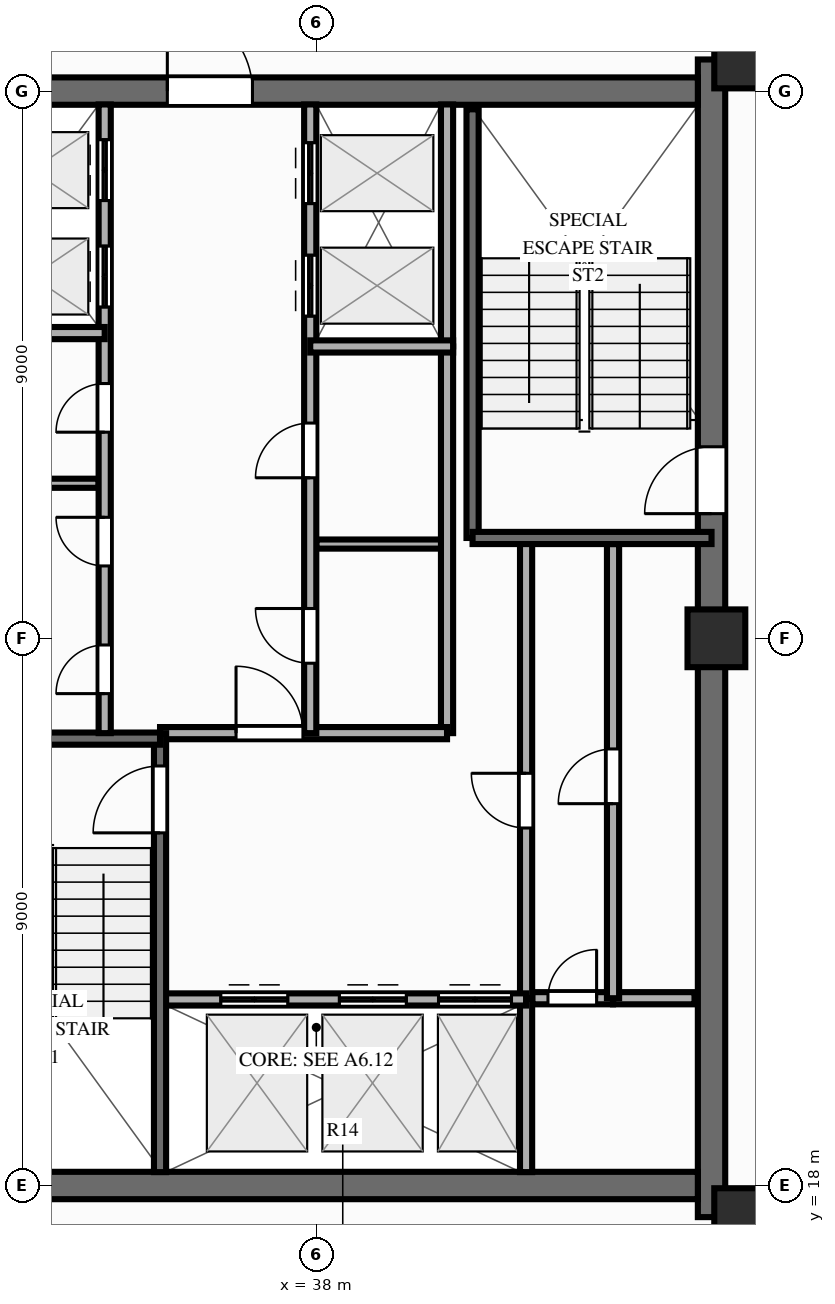
"""IFC4 building model, lengths in metres.
Left out: names, types, materials, properties, quantities, classifications, styles, units other than length and angle.
Written with IfcOpenShell. Run it as: python <this file> out.ifc"""

import sys

from ifc_helpers import new_model, si_unit, direction, frame, frame_2d, origin, origin_2d, place, context, subcontext, project, spatial, rectangle, extrude, source, transform, mapped, element, fill, save


model = new_model("IFC4")
c1 = context("Model", 3, precision=1e-05, world=origin(), true_north=direction((0.0, 1.0)))
c2 = subcontext(c1, "Body", "Model", "MODEL_VIEW")
j1 = project(units=[si_unit("LENGTHUNIT", "METRE"), si_unit("PLANEANGLEUNIT", "RADIAN")], contexts=[c1])
p1 = place(None, origin())
s1 = spatial("IfcSite", under=j1, at=p1, CompositionType="ELEMENT")
p2 = place(p1, origin())
s2 = spatial("IfcBuilding", under=s1, at=p2, CompositionType="ELEMENT")
p3 = place(p2, frame((0.0, 0.0, 216.3)))
s3 = spatial("IfcBuildingStorey", under=s2, at=p3, CompositionType="ELEMENT", Elevation=216.3)
p4 = place(p3, frame((44.5, 17.48, 0.0), z_axis=(0.0, 0.0, 1.0), x_axis=(0.0, 1.0, 0.0)))
e1 = element("IfcWall", 1, at=p4, inside=s3, PredefinedType="SHEAR", context=c2, shape_type="SweptSolid", body=[
    extrude(rectangle(XDim=19.04, YDim=0.45, at=frame_2d((9.52, 0.0))), origin(), (0.0, 0.0, 1.0), 3.9),
])
p5 = place(p4, frame((12.67, 0.0, 0.0), z_axis=(0.0, 0.0, 1.0), x_axis=(-1.0, 0.0, 0.0)))
e2 = element("IfcOpeningElement", 2, at=p5, cuts=e1, PredefinedType="OPENING", context=c2, shape_type="SweptSolid", body=[
    extrude(rectangle(XDim=1.1, YDim=2.15, at=frame_2d((0.55, 1.075))), frame((0.0, 0.237, 0.0), z_axis=(0.0, -1.0, 0.0), x_axis=(1.0, 0.0, 0.0)), (0.0, 0.0, 1.0), 0.474),
])
p6 = place(p3, frame((31.725, 18.0, 0.0), z_axis=(0.0, 0.0, 1.0), x_axis=(1.0, 0.0, 0.0)))
e3 = element("IfcWall", 3, at=p6, inside=s3, PredefinedType="SHEAR", context=c2, shape_type="SweptSolid", body=[
    extrude(rectangle(XDim=12.55, YDim=0.45, at=frame_2d((6.275, 0.0))), origin(), (0.0, 0.0, 1.0), 3.9),
])
p7 = place(p3, frame((31.725, 36.0, 0.0), z_axis=(0.0, 0.0, 1.0), x_axis=(1.0, 0.0, 0.0)))
e4 = element("IfcWall", 4, at=p7, inside=s3, PredefinedType="SHEAR", context=c2, shape_type="SweptSolid", body=[
    extrude(rectangle(XDim=12.55, YDim=0.45, at=frame_2d((6.275, 0.0))), origin(), (0.0, 0.0, 1.0), 3.9),
])
p8 = place(p7, frame((5.225, 0.0, 0.0), z_axis=(0.0, 0.0, 1.0), x_axis=(-1.0, 0.0, 0.0)))
e5 = element("IfcOpeningElement", 5, at=p8, cuts=e4, PredefinedType="OPENING", context=c2, shape_type="SweptSolid", body=[
    extrude(rectangle(XDim=1.4, YDim=2.15, at=frame_2d((0.7, 1.075))), frame((0.0, 0.237, 0.0), z_axis=(0.0, -1.0, 0.0), x_axis=(1.0, 0.0, 0.0)), (0.0, 0.0, 1.0), 0.474),
])
m1 = source(origin(), c2, "Body", "SweptSolid", [
    extrude(rectangle(XDim=0.95, YDim=0.95, at=origin_2d()), origin(), (0.0, 0.0, 1.0), 3.9),
])
for number, where, z_axis, x_axis in (
    (6, (45.02, 17.48, 0.0), (0.0, 0.0, 1.0), (1.0, 0.0, 0.0)),
    (7, (45.02, 36.52, 0.0), (0.0, 0.0, 1.0), (1.0, 0.0, 0.0)),
    (8, (44.58, 27.0, 0.0), (0.0, 0.0, 1.0), (1.0, 0.0, 0.0)),
):
    element("IfcColumn", number, at=place(p3, frame(where, z_axis=z_axis, x_axis=x_axis)), inside=s3, PredefinedType="COLUMN", context=c2, shape_type="MappedRepresentation", body=[
        mapped(m1, transform((0.0, 0.0, 0.0), scale=1.0)),
    ])
p9 = place(p3, frame((32.15, 29.55, 0.0), z_axis=(0.0, 0.0, 1.0), x_axis=(1.0, 0.0, 0.0)))
e9 = element("IfcWall", 9, at=p9, inside=s3, PredefinedType="PARTITIONING", context=c2, shape_type="SweptSolid", body=[
    extrude(rectangle(XDim=2.27, YDim=0.15, at=frame_2d((1.135, 0.0))), origin(), (0.0, 0.0, 1.0), 3.56),
])
p10 = place(p3, frame((38.0, 28.55, 0.0), z_axis=(0.0, 0.0, 1.0), x_axis=(1.0, 0.0, 0.0)))
e10 = element("IfcWall", 10, at=p10, inside=s3, PredefinedType="PARTITIONING", context=c2, shape_type="SweptSolid", body=[
    extrude(rectangle(XDim=2.2, YDim=0.15, at=frame_2d((1.1, 0.0))), origin(), (0.0, 0.0, 1.0), 3.04),
])
p11 = place(p3, frame((41.55, 21.08, 0.0), z_axis=(0.0, 0.0, 1.0), x_axis=(1.0, 0.0, 0.0)))
e11 = element("IfcWall", 11, at=p11, inside=s3, PredefinedType="PARTITIONING", context=c2, shape_type="SweptSolid", body=[
    extrude(rectangle(XDim=1.33, YDim=0.2, at=frame_2d((0.665, 0.0))), origin(), (0.0, 0.0, 1.0), 3.56),
])
p12 = place(p11, frame((0.26, 0.0, 0.0)))
e12 = element("IfcOpeningElement", 12, at=p12, cuts=e11, PredefinedType="OPENING", context=c2, shape_type="SweptSolid", body=[
    extrude(rectangle(XDim=0.8, YDim=2.05, at=frame_2d((0.4, 1.025))), frame((0.0, 0.112, 0.0), z_axis=(0.0, -1.0, 0.0), x_axis=(1.0, 0.0, 0.0)), (0.0, 0.0, 1.0), 0.224),
])
p13 = place(p3, frame((42.88, 21.08, 0.0), z_axis=(0.0, 0.0, 1.0), x_axis=(1.0, 0.0, 0.0)))
e13 = element("IfcWall", 13, at=p13, inside=s3, PredefinedType="PARTITIONING", context=c2, shape_type="SweptSolid", body=[
    extrude(rectangle(XDim=1.34, YDim=0.2, at=frame_2d((0.67, 0.0))), origin(), (0.0, 0.0, 1.0), 3.56),
])
p14 = place(p3, frame((42.88, 21.08, 0.0), z_axis=(0.0, 0.0, 1.0), x_axis=(0.0, 1.0, 0.0)))
e14 = element("IfcWall", 14, at=p14, inside=s3, PredefinedType="PARTITIONING", context=c2, shape_type="SweptSolid", body=[
    extrude(rectangle(XDim=7.47, YDim=0.2, at=frame_2d((3.735, 0.0))), origin(), (0.0, 0.0, 1.0), 3.56),
])
p15 = place(p14, frame((3.2, 0.0, 0.0)))
e15 = element("IfcOpeningElement", 15, at=p15, cuts=e14, PredefinedType="OPENING", context=c2, shape_type="SweptSolid", body=[
    extrude(rectangle(XDim=0.9, YDim=2.1, at=frame_2d((0.45, 1.05))), frame((0.0, 0.112, 0.0), z_axis=(0.0, -1.0, 0.0), x_axis=(1.0, 0.0, 0.0)), (0.0, 0.0, 1.0), 0.224),
])
p16 = place(p3, frame((41.45, 18.22, 0.0), z_axis=(0.0, 0.0, 1.0), x_axis=(0.0, 1.0, 0.0)))
e16 = element("IfcWall", 16, at=p16, inside=s3, PredefinedType="PARTITIONING", context=c2, shape_type="SweptSolid", body=[
    extrude(rectangle(XDim=2.86, YDim=0.2, at=frame_2d((1.43, 0.0))), origin(), (0.0, 0.0, 1.0), 3.56),
])
p17 = place(p3, frame((41.45, 21.08, 0.0), z_axis=(0.0, 0.0, 1.0), x_axis=(0.0, 1.0, 0.0)))
e17 = element("IfcWall", 17, at=p17, inside=s3, PredefinedType="PARTITIONING", context=c2, shape_type="SweptSolid", body=[
    extrude(rectangle(XDim=7.52, YDim=0.2, at=frame_2d((3.76, 0.0))), origin(), (0.0, 0.0, 1.0), 3.56),
])
p18 = place(p17, frame((2.8, 0.0, 0.0)))
e18 = element("IfcOpeningElement", 18, at=p18, cuts=e17, PredefinedType="OPENING", context=c2, shape_type="SweptSolid", body=[
    extrude(rectangle(XDim=0.9, YDim=2.1, at=frame_2d((0.45, 1.05))), frame((0.0, 0.112, 0.0), z_axis=(0.0, -1.0, 0.0), x_axis=(1.0, 0.0, 0.0)), (0.0, 0.0, 1.0), 0.224),
])
p19 = place(p3, frame((40.15, 25.44, 0.0), z_axis=(0.0, 0.0, 1.0), x_axis=(0.0, 1.0, 0.0)))
e19 = element("IfcWall", 19, at=p19, inside=s3, PredefinedType="PARTITIONING", context=c2, shape_type="SweptSolid", body=[
    extrude(rectangle(XDim=6.36, YDim=0.2, at=frame_2d((3.18, 0.0))), origin(), (0.0, 0.0, 1.0), 3.56),
])
p20 = place(p3, frame((40.15, 31.8, 0.0), z_axis=(0.0, 0.0, 1.0), x_axis=(0.0, 1.0, 0.0)))
e20 = element("IfcWall", 20, at=p20, inside=s3, PredefinedType="PARTITIONING", context=c2, shape_type="SweptSolid", body=[
    extrude(rectangle(XDim=3.98, YDim=0.2, at=frame_2d((1.99, 0.0))), origin(), (0.0, 0.0, 1.0), 3.56),
])
p21 = place(p3, frame((35.43, 21.06, 0.0), z_axis=(0.0, 0.0, 1.0), x_axis=(1.0, 0.0, 0.0)))
e21 = element("IfcWall", 21, at=p21, inside=s3, PredefinedType="PARTITIONING", context=c2, shape_type="SweptSolid", body=[
    extrude(rectangle(XDim=6.02, YDim=0.2, at=frame_2d((3.01, 0.0))), origin(), (0.0, 0.0, 1.0), 3.56),
])
p22 = place(p21, frame((1.0, 0.0, 0.0)))
e22 = element("IfcOpeningElement", 22, at=p22, cuts=e21, PredefinedType="OPENING", context=c2, shape_type="SweptSolid", body=[
    extrude(rectangle(XDim=1.1, YDim=2.15, at=frame_2d((0.55, 1.075))), frame((0.0, 0.112, 0.0), z_axis=(0.0, -1.0, 0.0), x_axis=(1.0, 0.0, 0.0)), (0.0, 0.0, 1.0), 0.224),
])
p23 = place(p21, frame((2.95, 0.0, 0.0)))
e23 = element("IfcOpeningElement", 23, at=p23, cuts=e21, PredefinedType="OPENING", context=c2, shape_type="SweptSolid", body=[
    extrude(rectangle(XDim=1.1, YDim=2.15, at=frame_2d((0.55, 1.075))), frame((0.0, 0.112, 0.0), z_axis=(0.0, -1.0, 0.0), x_axis=(1.0, 0.0, 0.0)), (0.0, 0.0, 1.0), 0.224),
])
p24 = place(p21, frame((4.58, 0.0, 0.0)))
e24 = element("IfcOpeningElement", 24, at=p24, cuts=e21, PredefinedType="OPENING", context=c2, shape_type="SweptSolid", body=[
    extrude(rectangle(XDim=1.2, YDim=2.15, at=frame_2d((0.6, 1.075))), frame((0.0, 0.112, 0.0), z_axis=(0.0, -1.0, 0.0), x_axis=(1.0, 0.0, 0.0)), (0.0, 0.0, 1.0), 0.224),
])
p25 = place(p3, frame((35.43, 25.44, 0.0), z_axis=(0.0, 0.0, 1.0), x_axis=(1.0, 0.0, 0.0)))
e25 = element("IfcWall", 25, at=p25, inside=s3, PredefinedType="PARTITIONING", context=c2, shape_type="SweptSolid", body=[
    extrude(rectangle(XDim=4.72, YDim=0.2, at=frame_2d((2.36, 0.0))), origin(), (0.0, 0.0, 1.0), 3.56),
])
p26 = place(p25, frame((1.25, 0.0, 0.0)))
e26 = element("IfcOpeningElement", 26, at=p26, cuts=e25, PredefinedType="OPENING", context=c2, shape_type="SweptSolid", body=[
    extrude(rectangle(XDim=1.1, YDim=2.15, at=frame_2d((0.55, 1.075))), frame((0.0, 0.112, 0.0), z_axis=(0.0, -1.0, 0.0), x_axis=(1.0, 0.0, 0.0)), (0.0, 0.0, 1.0), 0.224),
])
p27 = place(p3, frame((35.43, 18.22, 0.0), z_axis=(0.0, 0.0, 1.0), x_axis=(0.0, 1.0, 0.0)))
e27 = element("IfcWall", 27, at=p27, inside=s3, PredefinedType="SOLIDWALL", context=c2, shape_type="SweptSolid", body=[
    extrude(rectangle(XDim=7.22, YDim=0.2, at=frame_2d((3.61, 0.0))), origin(), (0.0, 0.0, 1.0), 3.69),
])
p28 = place(p27, frame((6.68, 0.0, 0.0), z_axis=(0.0, 0.0, 1.0), x_axis=(-1.0, 0.0, 0.0)))
e28 = element("IfcOpeningElement", 28, at=p28, cuts=e27, PredefinedType="OPENING", context=c2, shape_type="SweptSolid", body=[
    extrude(rectangle(XDim=1.1, YDim=2.15, at=frame_2d((0.55, 1.075))), frame((0.0, 0.112, 0.0), z_axis=(0.0, -1.0, 0.0), x_axis=(1.0, 0.0, 0.0)), (0.0, 0.0, 1.0), 0.224),
])
p29 = place(p3, frame((31.5, 25.35, 0.0), z_axis=(0.0, 0.0, 1.0), x_axis=(1.0, 0.0, 0.0)))
e29 = element("IfcWall", 29, at=p29, inside=s3, PredefinedType="SOLIDWALL", context=c2, shape_type="SweptSolid", body=[
    extrude(rectangle(XDim=3.93, YDim=0.2, at=frame_2d((1.965, 0.0))), origin(), (0.0, 0.0, 1.0), 3.69),
])
p30 = place(p3, frame((40.57, 28.65, 0.0), z_axis=(0.0, 0.0, 1.0), x_axis=(0.0, 1.0, 0.0)))
e30 = element("IfcWall", 30, at=p30, inside=s3, PredefinedType="SOLIDWALL", context=c2, shape_type="SweptSolid", body=[
    extrude(rectangle(XDim=7.05, YDim=0.2, at=frame_2d((3.525, 0.0))), origin(), (0.0, 0.0, 1.0), 3.69),
])
p31 = place(p3, frame((40.57, 28.65, 0.0), z_axis=(0.0, 0.0, 1.0), x_axis=(1.0, 0.0, 0.0)))
e31 = element("IfcWall", 31, at=p31, inside=s3, PredefinedType="SOLIDWALL", context=c2, shape_type="SweptSolid", body=[
    extrude(rectangle(XDim=3.93, YDim=0.2, at=frame_2d((1.965, 0.0))), origin(), (0.0, 0.0, 1.0), 3.69),
])
p32 = place(p3, frame((34.52, 25.44, 0.0), z_axis=(0.0, 0.0, 1.0), x_axis=(0.0, 1.0, 0.0)))
e32 = element("IfcWall", 32, at=p32, inside=s3, PredefinedType="PARTITIONING", context=c2, shape_type="SweptSolid", body=[
    extrude(rectangle(XDim=10.34, YDim=0.2, at=frame_2d((5.17, 0.0))), origin(), (0.0, 0.0, 1.0), 3.56),
])
p33 = place(p32, frame((0.65, 0.0, 0.0)))
e33 = element("IfcOpeningElement", 33, at=p33, cuts=e32, PredefinedType="OPENING", context=c2, shape_type="SweptSolid", body=[
    extrude(rectangle(XDim=0.8, YDim=2.05, at=frame_2d((0.4, 1.025))), frame((0.0, 0.112, 0.0), z_axis=(0.0, -1.0, 0.0), x_axis=(1.0, 0.0, 0.0)), (0.0, 0.0, 1.0), 0.224),
])
p34 = place(p32, frame((2.75, 0.0, 0.0)))
e34 = element("IfcOpeningElement", 34, at=p34, cuts=e32, PredefinedType="OPENING", context=c2, shape_type="SweptSolid", body=[
    extrude(rectangle(XDim=0.8, YDim=2.05, at=frame_2d((0.4, 1.025))), frame((0.0, 0.112, 0.0), z_axis=(0.0, -1.0, 0.0), x_axis=(1.0, 0.0, 0.0)), (0.0, 0.0, 1.0), 0.224),
])
p35 = place(p32, frame((4.95, 0.0, 0.0)))
e35 = element("IfcOpeningElement", 35, at=p35, cuts=e32, PredefinedType="OPENING", context=c2, shape_type="SweptSolid", body=[
    extrude(rectangle(XDim=0.8, YDim=2.05, at=frame_2d((0.4, 1.025))), frame((0.0, 0.112, 0.0), z_axis=(0.0, -1.0, 0.0), x_axis=(1.0, 0.0, 0.0)), (0.0, 0.0, 1.0), 0.224),
])
p36 = place(p32, frame((7.01, 0.0, 0.0)))
e36 = element("IfcOpeningElement", 36, at=p36, cuts=e32, PredefinedType="OPENING", context=c2, shape_type="SweptSolid", body=[
    extrude(rectangle(XDim=1.0, YDim=2.15, at=frame_2d((0.5, 1.075))), frame((0.0, 0.112, 0.0), z_axis=(0.0, -1.0, 0.0), x_axis=(1.0, 0.0, 0.0)), (0.0, 0.0, 1.0), 0.224),
])
p37 = place(p32, frame((8.76, 0.0, 0.0)))
e37 = element("IfcOpeningElement", 37, at=p37, cuts=e32, PredefinedType="OPENING", context=c2, shape_type="SweptSolid", body=[
    extrude(rectangle(XDim=1.0, YDim=2.15, at=frame_2d((0.5, 1.075))), frame((0.0, 0.112, 0.0), z_axis=(0.0, -1.0, 0.0), x_axis=(1.0, 0.0, 0.0)), (0.0, 0.0, 1.0), 0.224),
])
p38 = place(p3, frame((31.72, 32.02, 0.0), z_axis=(0.0, 0.0, 1.0), x_axis=(1.0, 0.0, 0.0)))
e38 = element("IfcWall", 38, at=p38, inside=s3, PredefinedType="PARTITIONING", context=c2, shape_type="SweptSolid", body=[
    extrude(rectangle(XDim=2.8, YDim=0.2, at=frame_2d((1.4, 0.0))), origin(), (0.0, 0.0, 1.0), 3.56),
])
p39 = place(p3, frame((37.9, 25.44, 0.0), z_axis=(0.0, 0.0, 1.0), x_axis=(0.0, 1.0, 0.0)))
e39 = element("IfcWall", 39, at=p39, inside=s3, PredefinedType="PARTITIONING", context=c2, shape_type="SweptSolid", body=[
    extrude(rectangle(XDim=10.34, YDim=0.2, at=frame_2d((5.17, 0.0))), origin(), (0.0, 0.0, 1.0), 3.56),
])
p40 = place(p39, frame((1.15, 0.0, 0.0)))
e40 = element("IfcOpeningElement", 40, at=p40, cuts=e39, PredefinedType="OPENING", context=c2, shape_type="SweptSolid", body=[
    extrude(rectangle(XDim=0.9, YDim=2.1, at=frame_2d((0.45, 1.05))), frame((0.0, 0.112, 0.0), z_axis=(0.0, -1.0, 0.0), x_axis=(1.0, 0.0, 0.0)), (0.0, 0.0, 1.0), 0.224),
])
p41 = place(p39, frame((4.2, 0.0, 0.0)))
e41 = element("IfcOpeningElement", 41, at=p41, cuts=e39, PredefinedType="OPENING", context=c2, shape_type="SweptSolid", body=[
    extrude(rectangle(XDim=0.9, YDim=2.1, at=frame_2d((0.45, 1.05))), frame((0.0, 0.112, 0.0), z_axis=(0.0, -1.0, 0.0), x_axis=(1.0, 0.0, 0.0)), (0.0, 0.0, 1.0), 0.224),
])
p42 = place(p39, frame((6.86, 0.0, 0.0)))
e42 = element("IfcOpeningElement", 42, at=p42, cuts=e39, PredefinedType="OPENING", context=c2, shape_type="SweptSolid", body=[
    extrude(rectangle(XDim=1.0, YDim=2.15, at=frame_2d((0.5, 1.075))), frame((0.0, 0.112, 0.0), z_axis=(0.0, -1.0, 0.0), x_axis=(1.0, 0.0, 0.0)), (0.0, 0.0, 1.0), 0.224),
])
p43 = place(p39, frame((8.71, 0.0, 0.0)))
e43 = element("IfcOpeningElement", 43, at=p43, cuts=e39, PredefinedType="OPENING", context=c2, shape_type="SweptSolid", body=[
    extrude(rectangle(XDim=1.0, YDim=2.15, at=frame_2d((0.5, 1.075))), frame((0.0, 0.112, 0.0), z_axis=(0.0, -1.0, 0.0), x_axis=(1.0, 0.0, 0.0)), (0.0, 0.0, 1.0), 0.224),
])
p44 = place(p3, frame((37.9, 31.8, 0.0), z_axis=(0.0, 0.0, 1.0), x_axis=(1.0, 0.0, 0.0)))
e44 = element("IfcWall", 44, at=p44, inside=s3, PredefinedType="PARTITIONING", context=c2, shape_type="SweptSolid", body=[
    extrude(rectangle(XDim=2.35, YDim=0.2, at=frame_2d((1.175, 0.0))), origin(), (0.0, 0.0, 1.0), 3.56),
])
m2 = source(origin(), c2, "Body", "SweptSolid", [
    extrude(rectangle(XDim=1.1, YDim=2.15, at=frame_2d((0.55, 1.075))), frame((0.0, 0.025, 0.0), z_axis=(0.0, -1.0, 0.0), x_axis=(1.0, 0.0, 0.0)), (0.0, 0.0, 1.0), 0.05),
])
p45 = place(p5, origin())
e45 = element("IfcDoor", 45, at=p45, inside=s3, OperationType="SINGLE_SWING_RIGHT", PredefinedType="DOOR", context=c2, shape_type="MappedRepresentation", body=[
    mapped(m2, transform((0.0, 0.0, 0.0), scale=1.0)),
])
fill(e2, e45)
m3 = source(origin(), c2, "Body", "SweptSolid", [
    extrude(rectangle(XDim=1.4, YDim=2.15, at=frame_2d((0.7, 1.075))), frame((0.0, 0.025, 0.0), z_axis=(0.0, -1.0, 0.0), x_axis=(1.0, 0.0, 0.0)), (0.0, 0.0, 1.0), 0.05),
])
p46 = place(p8, origin())
e46 = element("IfcDoor", 46, at=p46, inside=s3, OperationType="SINGLE_SWING_RIGHT", PredefinedType="DOOR", context=c2, shape_type="MappedRepresentation", body=[
    mapped(m3, transform((0.0, 0.0, 0.0), scale=1.0)),
])
fill(e5, e46)
m4 = source(origin(), c2, "Body", "SweptSolid", [
    extrude(rectangle(XDim=0.8, YDim=2.05, at=frame_2d((0.4, 1.025))), frame((0.0, 0.025, 0.0), z_axis=(0.0, -1.0, 0.0), x_axis=(1.0, 0.0, 0.0)), (0.0, 0.0, 1.0), 0.05),
])
p47 = place(p12, origin())
e47 = element("IfcDoor", 47, at=p47, inside=s3, OperationType="SINGLE_SWING_RIGHT", PredefinedType="DOOR", context=c2, shape_type="MappedRepresentation", body=[
    mapped(m4, transform((0.0, 0.0, 0.0), scale=1.0)),
])
fill(e12, e47)
m5 = source(origin(), c2, "Body", "SweptSolid", [
    extrude(rectangle(XDim=0.9, YDim=2.1, at=frame_2d((0.45, 1.05))), frame((0.0, 0.025, 0.0), z_axis=(0.0, -1.0, 0.0), x_axis=(1.0, 0.0, 0.0)), (0.0, 0.0, 1.0), 0.05),
])
p48 = place(p15, origin())
e48 = element("IfcDoor", 48, at=p48, inside=s3, OperationType="SINGLE_SWING_LEFT", PredefinedType="DOOR", context=c2, shape_type="MappedRepresentation", body=[
    mapped(m5, transform((0.0, 0.0, 0.0), scale=1.0)),
])
fill(e15, e48)
p49 = place(p18, origin())
e49 = element("IfcDoor", 49, at=p49, inside=s3, OperationType="SINGLE_SWING_RIGHT", PredefinedType="DOOR", context=c2, shape_type="MappedRepresentation", body=[
    mapped(m5, transform((0.0, 0.0, 0.0), scale=1.0)),
])
fill(e18, e49)
p50 = place(p22, origin())
e50 = element("IfcDoor", 50, at=p50, inside=s3, OperationType="DOUBLE_DOOR_SLIDING", PredefinedType="DOOR", context=c2, shape_type="MappedRepresentation", body=[
    mapped(m2, transform((0.0, 0.0, 0.0), scale=1.0)),
])
fill(e22, e50)
p51 = place(p23, origin())
e51 = element("IfcDoor", 51, at=p51, inside=s3, OperationType="DOUBLE_DOOR_SLIDING", PredefinedType="DOOR", context=c2, shape_type="MappedRepresentation", body=[
    mapped(m2, transform((0.0, 0.0, 0.0), scale=1.0)),
])
fill(e23, e51)
m6 = source(origin(), c2, "Body", "SweptSolid", [
    extrude(rectangle(XDim=1.2, YDim=2.15, at=frame_2d((0.6, 1.075))), frame((0.0, 0.025, 0.0), z_axis=(0.0, -1.0, 0.0), x_axis=(1.0, 0.0, 0.0)), (0.0, 0.0, 1.0), 0.05),
])
p52 = place(p24, origin())
e52 = element("IfcDoor", 52, at=p52, inside=s3, OperationType="DOUBLE_DOOR_SLIDING", PredefinedType="DOOR", context=c2, shape_type="MappedRepresentation", body=[
    mapped(m6, transform((0.0, 0.0, 0.0), scale=1.0)),
])
fill(e24, e52)
p53 = place(p26, origin())
e53 = element("IfcDoor", 53, at=p53, inside=s3, OperationType="SINGLE_SWING_LEFT", PredefinedType="DOOR", context=c2, shape_type="MappedRepresentation", body=[
    mapped(m2, transform((0.0, 0.0, 0.0), scale=1.0)),
])
fill(e26, e53)
p54 = place(p28, origin())
e54 = element("IfcDoor", 54, at=p54, inside=s3, OperationType="SINGLE_SWING_RIGHT", PredefinedType="DOOR", context=c2, shape_type="MappedRepresentation", body=[
    mapped(m2, transform((0.0, 0.0, 0.0), scale=1.0)),
])
fill(e28, e54)
p55 = place(p33, origin())
e55 = element("IfcDoor", 55, at=p55, inside=s3, OperationType="SINGLE_SWING_LEFT", PredefinedType="DOOR", context=c2, shape_type="MappedRepresentation", body=[
    mapped(m4, transform((0.0, 0.0, 0.0), scale=1.0)),
])
fill(e33, e55)
p56 = place(p34, origin())
e56 = element("IfcDoor", 56, at=p56, inside=s3, OperationType="SINGLE_SWING_RIGHT", PredefinedType="DOOR", context=c2, shape_type="MappedRepresentation", body=[
    mapped(m4, transform((0.0, 0.0, 0.0), scale=1.0)),
])
fill(e34, e56)
p57 = place(p35, origin())
e57 = element("IfcDoor", 57, at=p57, inside=s3, OperationType="SINGLE_SWING_LEFT", PredefinedType="DOOR", context=c2, shape_type="MappedRepresentation", body=[
    mapped(m4, transform((0.0, 0.0, 0.0), scale=1.0)),
])
fill(e35, e57)
m7 = source(origin(), c2, "Body", "SweptSolid", [
    extrude(rectangle(XDim=1.0, YDim=2.15, at=frame_2d((0.5, 1.075))), frame((0.0, 0.025, 0.0), z_axis=(0.0, -1.0, 0.0), x_axis=(1.0, 0.0, 0.0)), (0.0, 0.0, 1.0), 0.05),
])
p58 = place(p36, origin())
e58 = element("IfcDoor", 58, at=p58, inside=s3, OperationType="DOUBLE_DOOR_SLIDING", PredefinedType="DOOR", context=c2, shape_type="MappedRepresentation", body=[
    mapped(m7, transform((0.0, 0.0, 0.0), scale=1.0)),
])
fill(e36, e58)
p59 = place(p37, origin())
e59 = element("IfcDoor", 59, at=p59, inside=s3, OperationType="DOUBLE_DOOR_SLIDING", PredefinedType="DOOR", context=c2, shape_type="MappedRepresentation", body=[
    mapped(m7, transform((0.0, 0.0, 0.0), scale=1.0)),
])
fill(e37, e59)
p60 = place(p40, origin())
e60 = element("IfcDoor", 60, at=p60, inside=s3, OperationType="SINGLE_SWING_RIGHT", PredefinedType="DOOR", context=c2, shape_type="MappedRepresentation", body=[
    mapped(m5, transform((0.0, 0.0, 0.0), scale=1.0)),
])
fill(e40, e60)
p61 = place(p41, origin())
e61 = element("IfcDoor", 61, at=p61, inside=s3, OperationType="SINGLE_SWING_LEFT", PredefinedType="DOOR", context=c2, shape_type="MappedRepresentation", body=[
    mapped(m5, transform((0.0, 0.0, 0.0), scale=1.0)),
])
fill(e41, e61)
p62 = place(p42, origin())
e62 = element("IfcDoor", 62, at=p62, inside=s3, OperationType="DOUBLE_DOOR_SLIDING", PredefinedType="DOOR", context=c2, shape_type="MappedRepresentation", body=[
    mapped(m7, transform((0.0, 0.0, 0.0), scale=1.0)),
])
fill(e42, e62)
p63 = place(p43, origin())
e63 = element("IfcDoor", 63, at=p63, inside=s3, OperationType="DOUBLE_DOOR_SLIDING", PredefinedType="DOOR", context=c2, shape_type="MappedRepresentation", body=[
    mapped(m7, transform((0.0, 0.0, 0.0), scale=1.0)),
])
fill(e43, e63)
save(model, sys.argv[1])
